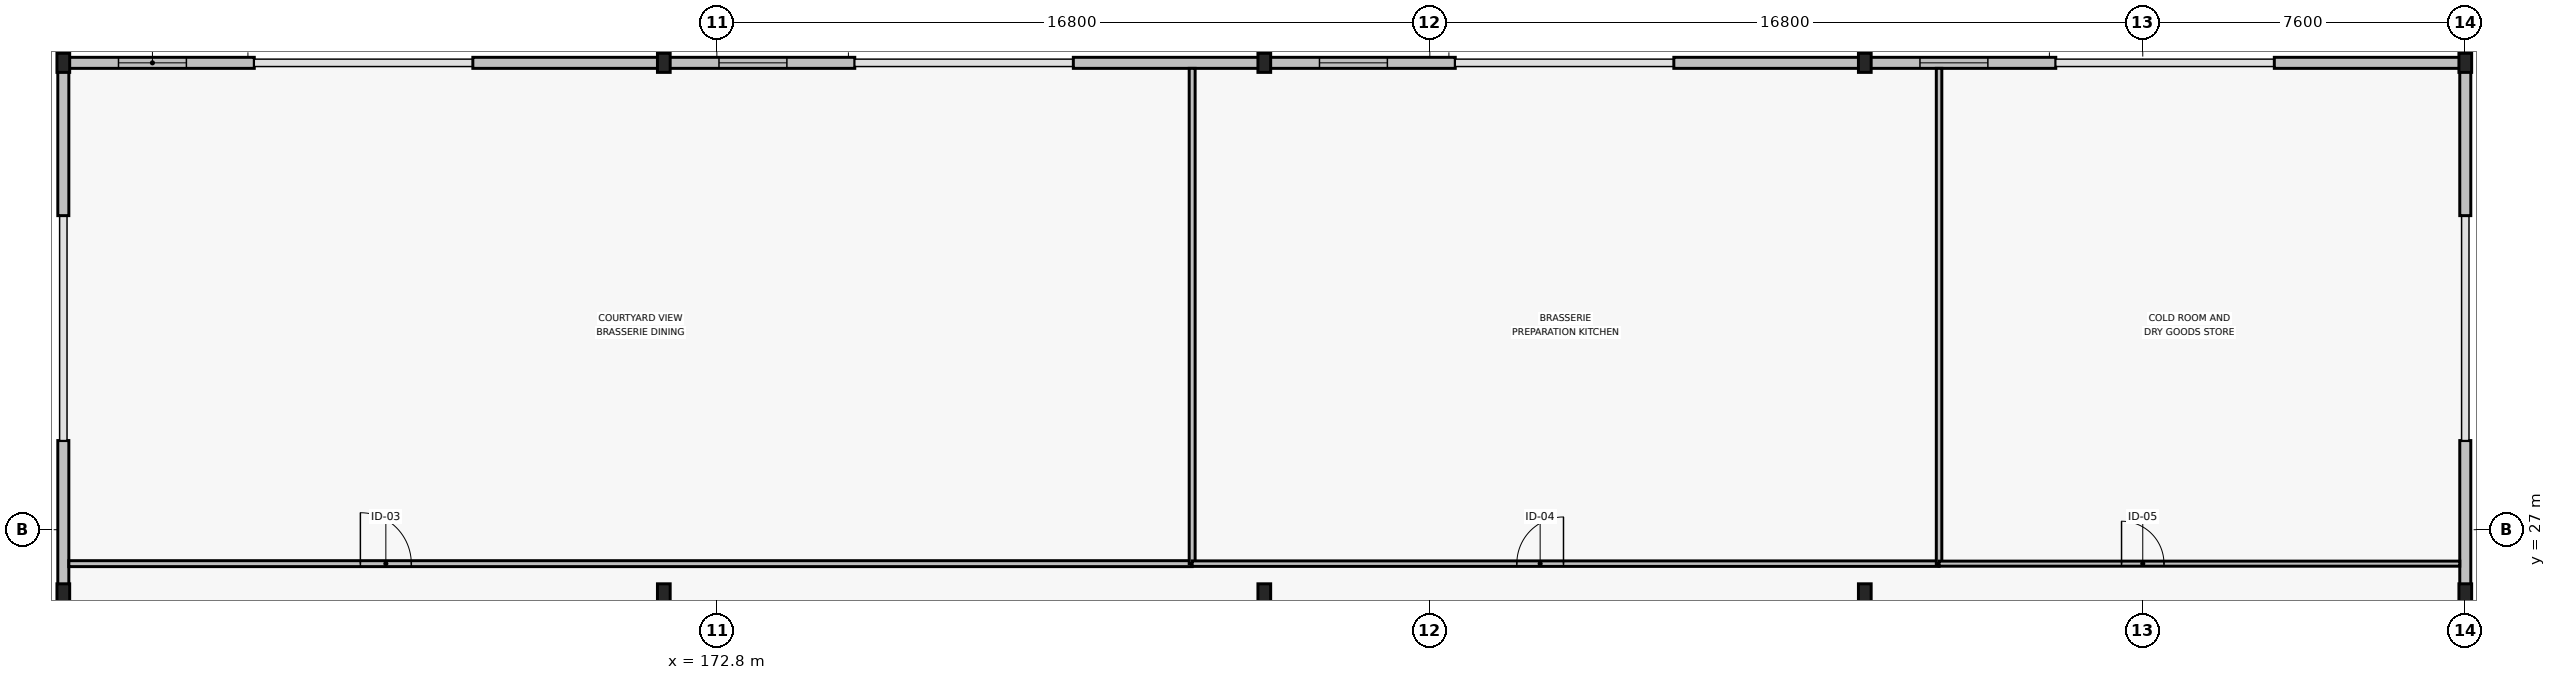
"""IFC4 building model, lengths in metres.
Left out: names, types, materials, properties, quantities, classifications, styles, units other than length and angle.
Written with IfcOpenShell. Run it as: python <this file> out.ifc"""

import sys

from ifc_helpers import new_model, si_unit, direction, frame, frame_2d, origin, origin_2d, place, context, subcontext, project, spatial, rectangle, i_section, extrude, element, fill, save


model = new_model("IFC4")
c1 = context("Model", 3, precision=1e-05, world=origin(), true_north=direction((0.0, 1.0)))
c2 = subcontext(c1, "Body", "Model", "MODEL_VIEW")
j1 = project(units=[si_unit("LENGTHUNIT", "METRE"), si_unit("PLANEANGLEUNIT", "RADIAN")], contexts=[c1])
p1 = place(None, origin())
s1 = spatial("IfcSite", under=j1, at=p1, CompositionType="ELEMENT")
p2 = place(p1, origin())
s2 = spatial("IfcBuilding", under=s1, at=p2, CompositionType="ELEMENT")
p3 = place(p2, frame((0.0, 0.0, 5.4)))
s3 = spatial("IfcBuildingStorey", under=s2, at=p3, CompositionType="ELEMENT", Elevation=5.4)
for number, where, z_axis, x_axis in (
    (1, (157.4, 25.5, 0.0), (0.0, 0.0, 1.0), (1.0, 0.0, 0.0)),
    (2, (157.4, 38.0, 0.0), (0.0, 0.0, 1.0), (1.0, 0.0, 0.0)),
    (3, (171.55, 25.5, 0.0), (0.0, 0.0, 1.0), (1.0, 0.0, 0.0)),
    (4, (171.55, 38.0, 0.0), (0.0, 0.0, 1.0), (1.0, 0.0, 0.0)),
    (5, (185.7, 25.5, 0.0), (0.0, 0.0, 1.0), (1.0, 0.0, 0.0)),
    (6, (185.7, 38.0, 0.0), (0.0, 0.0, 1.0), (1.0, 0.0, 0.0)),
    (7, (199.85, 25.5, 0.0), (0.0, 0.0, 1.0), (1.0, 0.0, 0.0)),
    (8, (199.85, 38.0, 0.0), (0.0, 0.0, 1.0), (1.0, 0.0, 0.0)),
    (9, (214.0, 25.5, 0.0), (0.0, 0.0, 1.0), (1.0, 0.0, 0.0)),
    (10, (214.0, 38.0, 0.0), (0.0, 0.0, 1.0), (1.0, 0.0, 0.0)),
):
    element("IfcColumn", number, at=place(p3, frame(where, z_axis=z_axis, x_axis=x_axis)), inside=s3, PredefinedType="COLUMN", context=c2, shape_type="SweptSolid", body=[
        extrude(i_section(OverallWidth=0.3, OverallDepth=0.45, WebThickness=0.014, FlangeThickness=0.026, FilletRadius=0.027, at=origin_2d()), origin(), (0.0, 0.0, 1.0), 5.4),
    ])
p4 = place(p3, frame((157.4, 38.0, 0.0), z_axis=(0.0, 0.0, 1.0), x_axis=(1.0, 0.0, 0.0)))
e11 = element("IfcWall", 11, at=p4, inside=s3, PredefinedType="STANDARD", context=c2, shape_type="SweptSolid", body=[
    extrude(rectangle(XDim=4.5, YDim=0.26, at=frame_2d((2.25, 0.0))), origin(), (0.0, 0.0, 1.0), 4.625),
])
p5 = place(p4, frame((1.3, 0.0, 0.7)))
e12 = element("IfcOpeningElement", 12, at=p5, cuts=e11, PredefinedType="OPENING", context=c2, shape_type="SweptSolid", body=[
    extrude(rectangle(XDim=1.6, YDim=1.5, at=frame_2d((0.8, 0.75))), frame((0.0, 0.14, 0.0), z_axis=(0.0, -1.0, 0.0), x_axis=(1.0, 0.0, 0.0)), (0.0, 0.0, 1.0), 0.28),
])
p6 = place(p3, frame((167.05, 38.0, 0.0), z_axis=(0.0, 0.0, 1.0), x_axis=(1.0, 0.0, 0.0)))
e13 = element("IfcWall", 13, at=p6, inside=s3, PredefinedType="STANDARD", context=c2, shape_type="SweptSolid", body=[
    extrude(rectangle(XDim=4.5, YDim=0.26, at=frame_2d((2.25, 0.0))), origin(), (0.0, 0.0, 1.0), 4.625),
])
p7 = place(p3, frame((171.55, 38.0, 0.0), z_axis=(0.0, 0.0, 1.0), x_axis=(1.0, 0.0, 0.0)))
e14 = element("IfcWall", 14, at=p7, inside=s3, PredefinedType="STANDARD", context=c2, shape_type="SweptSolid", body=[
    extrude(rectangle(XDim=4.5, YDim=0.26, at=frame_2d((2.25, 0.0))), origin(), (0.0, 0.0, 1.0), 4.625),
])
p8 = place(p7, frame((1.3, 0.0, 0.7)))
e15 = element("IfcOpeningElement", 15, at=p8, cuts=e14, PredefinedType="OPENING", context=c2, shape_type="SweptSolid", body=[
    extrude(rectangle(XDim=1.6, YDim=1.5, at=frame_2d((0.8, 0.75))), frame((0.0, 0.14, 0.0), z_axis=(0.0, -1.0, 0.0), x_axis=(1.0, 0.0, 0.0)), (0.0, 0.0, 1.0), 0.28),
])
p9 = place(p3, frame((181.2, 38.0, 0.0), z_axis=(0.0, 0.0, 1.0), x_axis=(1.0, 0.0, 0.0)))
e16 = element("IfcWall", 16, at=p9, inside=s3, PredefinedType="STANDARD", context=c2, shape_type="SweptSolid", body=[
    extrude(rectangle(XDim=4.5, YDim=0.26, at=frame_2d((2.25, 0.0))), origin(), (0.0, 0.0, 1.0), 4.625),
])
p10 = place(p3, frame((185.7, 38.0, 0.0), z_axis=(0.0, 0.0, 1.0), x_axis=(1.0, 0.0, 0.0)))
e17 = element("IfcWall", 17, at=p10, inside=s3, PredefinedType="STANDARD", context=c2, shape_type="SweptSolid", body=[
    extrude(rectangle(XDim=4.5, YDim=0.26, at=frame_2d((2.25, 0.0))), origin(), (0.0, 0.0, 1.0), 4.625),
])
p11 = place(p10, frame((1.3, 0.0, 0.7)))
e18 = element("IfcOpeningElement", 18, at=p11, cuts=e17, PredefinedType="OPENING", context=c2, shape_type="SweptSolid", body=[
    extrude(rectangle(XDim=1.6, YDim=1.5, at=frame_2d((0.8, 0.75))), frame((0.0, 0.14, 0.0), z_axis=(0.0, -1.0, 0.0), x_axis=(1.0, 0.0, 0.0)), (0.0, 0.0, 1.0), 0.28),
])
p12 = place(p3, frame((195.35, 38.0, 0.0), z_axis=(0.0, 0.0, 1.0), x_axis=(1.0, 0.0, 0.0)))
e19 = element("IfcWall", 19, at=p12, inside=s3, PredefinedType="STANDARD", context=c2, shape_type="SweptSolid", body=[
    extrude(rectangle(XDim=4.5, YDim=0.26, at=frame_2d((2.25, 0.0))), origin(), (0.0, 0.0, 1.0), 4.625),
])
p13 = place(p3, frame((199.85, 38.0, 0.0), z_axis=(0.0, 0.0, 1.0), x_axis=(1.0, 0.0, 0.0)))
e20 = element("IfcWall", 20, at=p13, inside=s3, PredefinedType="STANDARD", context=c2, shape_type="SweptSolid", body=[
    extrude(rectangle(XDim=4.5, YDim=0.26, at=frame_2d((2.25, 0.0))), origin(), (0.0, 0.0, 1.0), 4.625),
])
p14 = place(p13, frame((1.3, 0.0, 0.7)))
e21 = element("IfcOpeningElement", 21, at=p14, cuts=e20, PredefinedType="OPENING", context=c2, shape_type="SweptSolid", body=[
    extrude(rectangle(XDim=1.6, YDim=1.5, at=frame_2d((0.8, 0.75))), frame((0.0, 0.14, 0.0), z_axis=(0.0, -1.0, 0.0), x_axis=(1.0, 0.0, 0.0)), (0.0, 0.0, 1.0), 0.28),
])
p15 = place(p3, frame((209.5, 38.0, 0.0), z_axis=(0.0, 0.0, 1.0), x_axis=(1.0, 0.0, 0.0)))
e22 = element("IfcWall", 22, at=p15, inside=s3, PredefinedType="STANDARD", context=c2, shape_type="SweptSolid", body=[
    extrude(rectangle(XDim=4.5, YDim=0.26, at=frame_2d((2.25, 0.0))), origin(), (0.0, 0.0, 1.0), 4.625),
])
for number, where, z_axis, x_axis in (
    (23, (157.4, 21.9, 0.0), (0.0, 0.0, 1.0), (0.0, 1.0, 0.0)),
    (24, (157.4, 25.5, 0.0), (0.0, 0.0, 1.0), (0.0, 1.0, 0.0)),
):
    element("IfcWall", number, at=place(p3, frame(where, z_axis=z_axis, x_axis=x_axis)), inside=s3, PredefinedType="STANDARD", context=c2, shape_type="SweptSolid", body=[
        extrude(rectangle(XDim=3.6, YDim=0.26, at=frame_2d((1.8, 0.0))), origin(), (0.0, 0.0, 1.0), 4.675),
    ])
p16 = place(p3, frame((157.4, 34.4, 0.0), z_axis=(0.0, 0.0, 1.0), x_axis=(0.0, 1.0, 0.0)))
e25 = element("IfcWall", 25, at=p16, inside=s3, PredefinedType="STANDARD", context=c2, shape_type="SweptSolid", body=[
    extrude(rectangle(XDim=3.47, YDim=0.26, at=frame_2d((1.735, 0.0))), origin(), (0.0, 0.0, 1.0), 4.675),
])
for number, where, z_axis, x_axis in (
    (26, (214.0, 21.9, 0.0), (0.0, 0.0, 1.0), (0.0, 1.0, 0.0)),
    (27, (214.0, 25.5, 0.0), (0.0, 0.0, 1.0), (0.0, 1.0, 0.0)),
):
    element("IfcWall", number, at=place(p3, frame(where, z_axis=z_axis, x_axis=x_axis)), inside=s3, PredefinedType="STANDARD", context=c2, shape_type="SweptSolid", body=[
        extrude(rectangle(XDim=3.6, YDim=0.26, at=frame_2d((1.8, 0.0))), origin(), (0.0, 0.0, 1.0), 4.675),
    ])
p17 = place(p3, frame((214.0, 34.4, 0.0), z_axis=(0.0, 0.0, 1.0), x_axis=(0.0, 1.0, 0.0)))
e28 = element("IfcWall", 28, at=p17, inside=s3, PredefinedType="STANDARD", context=c2, shape_type="SweptSolid", body=[
    extrude(rectangle(XDim=3.47, YDim=0.26, at=frame_2d((1.735, 0.0))), origin(), (0.0, 0.0, 1.0), 4.675),
])
p18 = place(p3, frame((157.53, 26.2, 0.0), z_axis=(0.0, 0.0, 1.0), x_axis=(1.0, 0.0, 0.0)))
e29 = element("IfcWall", 29, at=p18, inside=s3, PredefinedType="PARTITIONING", context=c2, shape_type="SweptSolid", body=[
    extrude(rectangle(XDim=26.47, YDim=0.14, at=frame_2d((13.235, 0.0))), origin(), (0.0, 0.0, 1.0), 4.625),
])
p19 = place(p18, frame((6.87, 0.0, 0.0)))
e30 = element("IfcOpeningElement", 30, at=p19, cuts=e29, PredefinedType="OPENING", context=c2, shape_type="SweptSolid", body=[
    extrude(rectangle(XDim=1.2, YDim=2.2, at=frame_2d((0.6, 1.1))), frame((0.0, 0.08, 0.0), z_axis=(0.0, -1.0, 0.0), x_axis=(1.0, 0.0, 0.0)), (0.0, 0.0, 1.0), 0.16),
])
p20 = place(p3, frame((184.0, 26.2, 0.0), z_axis=(0.0, 0.0, 1.0), x_axis=(0.0, 1.0, 0.0)))
e31 = element("IfcWall", 31, at=p20, inside=s3, PredefinedType="PARTITIONING", context=c2, shape_type="SweptSolid", body=[
    extrude(rectangle(XDim=11.67, YDim=0.14, at=frame_2d((5.835, 0.0))), origin(), (0.0, 0.0, 1.0), 5.16),
])
p21 = place(p3, frame((184.0, 26.2, 0.0), z_axis=(0.0, 0.0, 1.0), x_axis=(1.0, 0.0, 0.0)))
e32 = element("IfcWall", 32, at=p21, inside=s3, PredefinedType="PARTITIONING", context=c2, shape_type="SweptSolid", body=[
    extrude(rectangle(XDim=17.6, YDim=0.13, at=frame_2d((8.8, 0.0))), origin(), (0.0, 0.0, 1.0), 4.625),
])
p22 = place(p21, frame((8.75, 0.0, 0.0), z_axis=(0.0, 0.0, 1.0), x_axis=(-1.0, 0.0, 0.0)))
e33 = element("IfcOpeningElement", 33, at=p22, cuts=e32, PredefinedType="OPENING", context=c2, shape_type="SweptSolid", body=[
    extrude(rectangle(XDim=1.1, YDim=2.15, at=frame_2d((0.55, 1.075))), frame((0.0, 0.075, 0.0), z_axis=(0.0, -1.0, 0.0), x_axis=(1.0, 0.0, 0.0)), (0.0, 0.0, 1.0), 0.15),
])
p23 = place(p3, frame((201.6, 26.2, 0.0), z_axis=(0.0, 0.0, 1.0), x_axis=(0.0, 1.0, 0.0)))
e34 = element("IfcWall", 34, at=p23, inside=s3, PredefinedType="PARTITIONING", context=c2, shape_type="SweptSolid", body=[
    extrude(rectangle(XDim=11.67, YDim=0.13, at=frame_2d((5.835, 0.0))), origin(), (0.0, 0.0, 1.0), 5.16),
])
p24 = place(p3, frame((201.6, 26.2, 0.0), z_axis=(0.0, 0.0, 1.0), x_axis=(1.0, 0.0, 0.0)))
e35 = element("IfcWall", 35, at=p24, inside=s3, PredefinedType="PARTITIONING", context=c2, shape_type="SweptSolid", body=[
    extrude(rectangle(XDim=12.27, YDim=0.12, at=frame_2d((6.135, 0.0))), origin(), (0.0, 0.0, 1.0), 4.625),
])
p25 = place(p24, frame((4.3, 0.0, 0.0)))
e36 = element("IfcOpeningElement", 36, at=p25, cuts=e35, PredefinedType="OPENING", context=c2, shape_type="SweptSolid", body=[
    extrude(rectangle(XDim=1.0, YDim=2.15, at=frame_2d((0.5, 1.075))), frame((0.0, 0.07, 0.0), z_axis=(0.0, -1.0, 0.0), x_axis=(1.0, 0.0, 0.0)), (0.0, 0.0, 1.0), 0.14),
])
p26 = place(p5, origin())
e37 = element("IfcWindow", 37, at=p26, inside=s3, PartitioningType="SINGLE_PANEL", PredefinedType="WINDOW", context=c2, shape_type="SweptSolid", body=[
    extrude(rectangle(XDim=1.6, YDim=1.5, at=frame_2d((0.8, 0.75))), frame((0.0, 0.03, 0.0), z_axis=(0.0, -1.0, 0.0), x_axis=(1.0, 0.0, 0.0)), (0.0, 0.0, 1.0), 0.06),
])
fill(e12, e37)
p27 = place(p8, origin())
e38 = element("IfcWindow", 38, at=p27, inside=s3, PartitioningType="SINGLE_PANEL", PredefinedType="WINDOW", context=c2, shape_type="SweptSolid", body=[
    extrude(rectangle(XDim=1.6, YDim=1.5, at=frame_2d((0.8, 0.75))), frame((0.0, 0.03, 0.0), z_axis=(0.0, -1.0, 0.0), x_axis=(1.0, 0.0, 0.0)), (0.0, 0.0, 1.0), 0.06),
])
fill(e15, e38)
p28 = place(p11, origin())
e39 = element("IfcWindow", 39, at=p28, inside=s3, PartitioningType="SINGLE_PANEL", PredefinedType="WINDOW", context=c2, shape_type="SweptSolid", body=[
    extrude(rectangle(XDim=1.6, YDim=1.5, at=frame_2d((0.8, 0.75))), frame((0.0, 0.03, 0.0), z_axis=(0.0, -1.0, 0.0), x_axis=(1.0, 0.0, 0.0)), (0.0, 0.0, 1.0), 0.06),
])
fill(e18, e39)
p29 = place(p14, origin())
e40 = element("IfcWindow", 40, at=p29, inside=s3, PartitioningType="SINGLE_PANEL", PredefinedType="WINDOW", context=c2, shape_type="SweptSolid", body=[
    extrude(rectangle(XDim=1.6, YDim=1.5, at=frame_2d((0.8, 0.75))), frame((0.0, 0.03, 0.0), z_axis=(0.0, -1.0, 0.0), x_axis=(1.0, 0.0, 0.0)), (0.0, 0.0, 1.0), 0.06),
])
fill(e21, e40)
p30 = place(p19, origin())
e41 = element("IfcDoor", 41, at=p30, inside=s3, OperationType="SINGLE_SWING_LEFT", PredefinedType="DOOR", context=c2, shape_type="SweptSolid", body=[
    extrude(rectangle(XDim=1.2, YDim=2.2, at=frame_2d((0.6, 1.1))), frame((0.0, 0.025, 0.0), z_axis=(0.0, -1.0, 0.0), x_axis=(1.0, 0.0, 0.0)), (0.0, 0.0, 1.0), 0.05),
])
fill(e30, e41)
p31 = place(p22, origin())
e42 = element("IfcDoor", 42, at=p31, inside=s3, OperationType="SINGLE_SWING_RIGHT", PredefinedType="DOOR", context=c2, shape_type="SweptSolid", body=[
    extrude(rectangle(XDim=1.1, YDim=2.15, at=frame_2d((0.55, 1.075))), frame((0.0, 0.025, 0.0), z_axis=(0.0, -1.0, 0.0), x_axis=(1.0, 0.0, 0.0)), (0.0, 0.0, 1.0), 0.05),
])
fill(e33, e42)
p32 = place(p25, origin())
e43 = element("IfcDoor", 43, at=p32, inside=s3, OperationType="SINGLE_SWING_LEFT", PredefinedType="DOOR", context=c2, shape_type="SweptSolid", body=[
    extrude(rectangle(XDim=1.0, YDim=2.15, at=frame_2d((0.5, 1.075))), frame((0.0, 0.025, 0.0), z_axis=(0.0, -1.0, 0.0), x_axis=(1.0, 0.0, 0.0)), (0.0, 0.0, 1.0), 0.05),
])
fill(e36, e43)
save(model, sys.argv[1])
